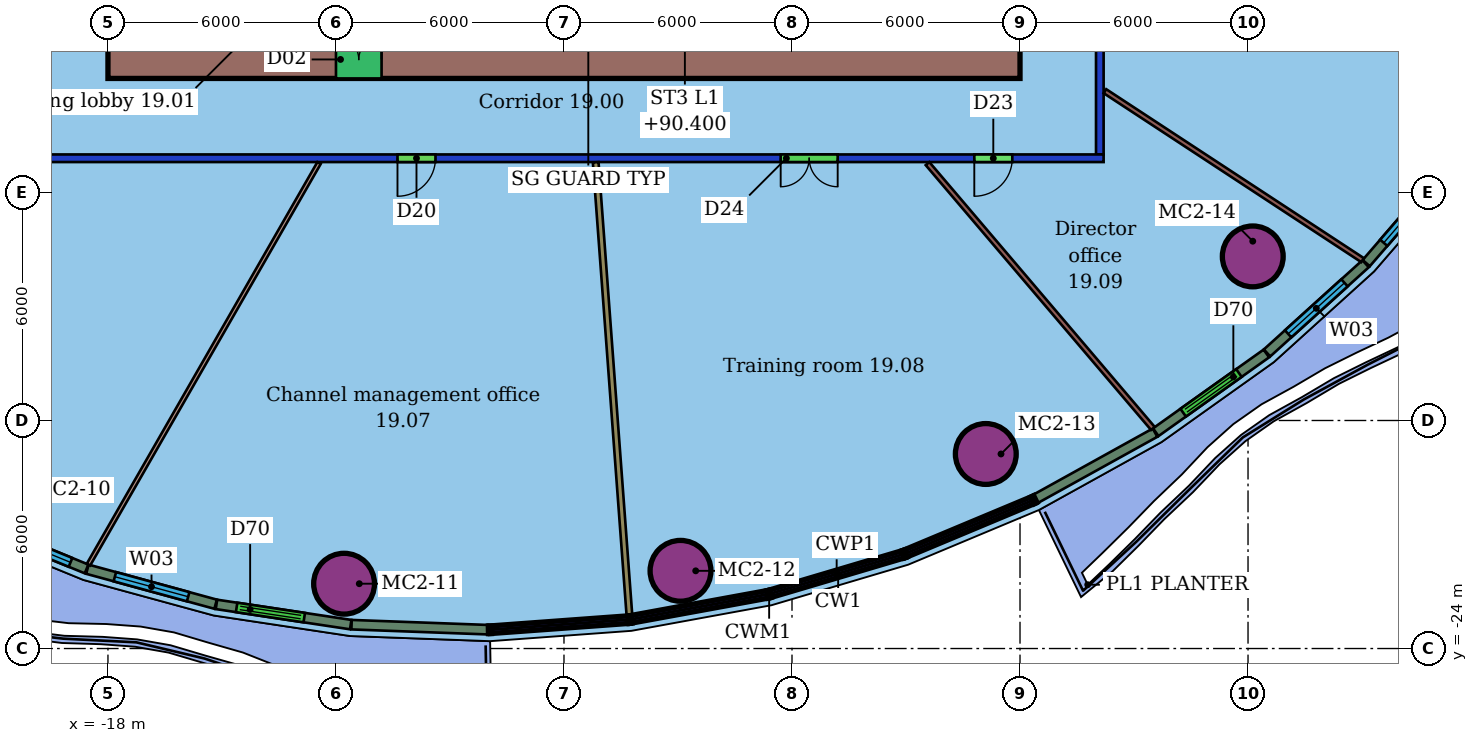
"""IFC4 building model, lengths in metres.
Left out: names, types, materials, properties, quantities, classifications, styles, units other than length and angle.
Written with IfcOpenShell. Run it as: python <this file> out.ifc"""

import sys

from ifc_helpers import new_model, si_unit, direction, frame, frame_2d, origin, origin_2d, place, context, subcontext, project, spatial, rectangle, hollow_circle, extrude, element, fill, save


model = new_model("IFC4")
c1 = context("Model", 3, precision=1e-05, world=origin(), true_north=direction((0.0, 1.0)))
c2 = subcontext(c1, "Body", "Model", "MODEL_VIEW")
j1 = project(units=[si_unit("LENGTHUNIT", "METRE"), si_unit("PLANEANGLEUNIT", "RADIAN")], contexts=[c1])
p1 = place(None, origin())
s1 = spatial("IfcSite", under=j1, at=p1, CompositionType="ELEMENT")
p2 = place(p1, origin())
s2 = spatial("IfcBuilding", under=s1, at=p2, CompositionType="ELEMENT")
p3 = place(p2, frame((0.0, 0.0, 88.6)))
s3 = spatial("IfcBuildingStorey", under=s2, at=p3, CompositionType="ELEMENT", Elevation=88.6)
for number, where, z_axis, x_axis in (
    (1, (-11.787, -22.294, 0.0), (0.0, 0.0, 1.0), (1.0, 0.0, 0.0)),
    (2, (-2.934, -21.956, 0.0), (0.0, 0.0, 1.0), (1.0, 0.0, 0.0)),
    (3, (5.1, -18.881, 0.0), (0.0, 0.0, 1.0), (1.0, 0.0, 0.0)),
    (4, (12.125, -13.683, 0.0), (0.0, 0.0, 1.0), (1.0, 0.0, 0.0)),
):
    element("IfcColumn", number, at=place(p3, frame(where, z_axis=z_axis, x_axis=x_axis)), inside=s3, PredefinedType="COLUMN", context=c2, shape_type="SweptSolid", body=[
        extrude(hollow_circle(Radius=0.8, WallThickness=0.055, at=origin_2d()), origin(), (0.0, 0.0, 1.0), 3.45),
    ])
p4 = place(p3, frame((8.2, -11.1, 0.0), z_axis=(0.0, 0.0, 1.0), x_axis=(-1.0, 0.0, 0.0)))
e5 = element("IfcWall", 5, at=p4, inside=s3, PredefinedType="PARTITIONING", context=c2, shape_type="SweptSolid", body=[
    extrude(rectangle(XDim=28.4, YDim=0.2, at=frame_2d((14.2, 0.0))), origin(), (0.0, 0.0, 1.0), 3.0),
])
p5 = place(p4, frame((17.581, 0.0, 0.0)))
e6 = element("IfcOpeningElement", 6, at=p5, cuts=e5, PredefinedType="OPENING", context=c2, shape_type="SweptSolid", body=[
    extrude(rectangle(XDim=1.0, YDim=2.1, at=frame_2d((0.5, 1.05))), frame((0.0, 0.11, 0.0), z_axis=(0.0, -1.0, 0.0), x_axis=(1.0, 0.0, 0.0)), (0.0, 0.0, 1.0), 0.22),
])
p6 = place(p4, frame((6.998, 0.0, 0.0)))
e7 = element("IfcOpeningElement", 7, at=p6, cuts=e5, PredefinedType="OPENING", context=c2, shape_type="SweptSolid", body=[
    extrude(rectangle(XDim=1.5, YDim=2.1, at=frame_2d((0.75, 1.05))), frame((0.0, 0.11, 0.0), z_axis=(0.0, -1.0, 0.0), x_axis=(1.0, 0.0, 0.0)), (0.0, 0.0, 1.0), 0.22),
])
p7 = place(p4, frame((2.403, 0.0, 0.0)))
e8 = element("IfcOpeningElement", 8, at=p7, cuts=e5, PredefinedType="OPENING", context=c2, shape_type="SweptSolid", body=[
    extrude(rectangle(XDim=1.0, YDim=2.4, at=frame_2d((0.5, 1.2))), frame((0.0, 0.11, 0.0), z_axis=(0.0, -1.0, 0.0), x_axis=(1.0, 0.0, 0.0)), (0.0, 0.0, 1.0), 0.22),
])
p8 = place(p3, frame((8.1, 11.0, 0.0), z_axis=(0.0, 0.0, 1.0), x_axis=(0.0, -1.0, 0.0)))
e9 = element("IfcWall", 9, at=p8, inside=s3, PredefinedType="PARTITIONING", context=c2, shape_type="SweptSolid", body=[
    extrude(rectangle(XDim=22.0, YDim=0.2, at=frame_2d((11.0, 0.0))), origin(), (0.0, 0.0, 1.0), 3.0),
])
p9 = place(p8, frame((11.043, 0.0, 0.0)))
e10 = element("IfcOpeningElement", 10, at=p9, cuts=e9, PredefinedType="OPENING", context=c2, shape_type="SweptSolid", body=[
    extrude(rectangle(XDim=1.8, YDim=2.1, at=frame_2d((0.9, 1.05))), frame((0.0, 0.11, 0.0), z_axis=(0.0, -1.0, 0.0), x_axis=(1.0, 0.0, 0.0)), (0.0, 0.0, 1.0), 0.22),
])
p10 = place(p3, frame((-18.512, -21.792, 0.0), z_axis=(0.0, 0.0, 1.0), x_axis=(0.497918029238, 0.867224098004, 0.0)))
e11 = element("IfcWall", 11, at=p10, inside=s3, PredefinedType="PARTITIONING", context=c2, shape_type="SweptSolid", body=[
    extrude(rectangle(XDim=12.185, YDim=0.1, at=frame_2d((6.093, 0.0))), origin(), (0.0, 0.0, 1.0), 3.45),
])
p11 = place(p3, frame((-4.279, -23.113, 0.0), z_axis=(0.0, 0.0, 1.0), x_axis=(-0.074241475943, 0.997240293635, 0.0)))
e12 = element("IfcWall", 12, at=p11, inside=s3, PredefinedType="PARTITIONING", context=c2, shape_type="SweptSolid", body=[
    extrude(rectangle(XDim=11.94, YDim=0.15, at=frame_2d((5.97, 0.0))), origin(), (0.0, 0.0, 1.0), 3.45),
])
p12 = place(p3, frame((9.496, -18.209, 0.0), z_axis=(0.0, 0.0, 1.0), x_axis=(-0.648104472947, 0.761551437624, 0.0)))
e13 = element("IfcWall", 13, at=p12, inside=s3, PredefinedType="PARTITIONING", context=c2, shape_type="SweptSolid", body=[
    extrude(rectangle(XDim=9.15, YDim=0.125, at=frame_2d((4.575, 0.0))), origin(), (0.0, 0.0, 1.0), 3.45),
])
p13 = place(p3, frame((15.013, -13.78, 0.0), z_axis=(0.0, 0.0, 1.0), x_axis=(-0.836224442923, 0.548387345822, 0.0)))
e14 = element("IfcWall", 14, at=p13, inside=s3, PredefinedType="PARTITIONING", context=c2, shape_type="SweptSolid", body=[
    extrude(rectangle(XDim=8.106, YDim=0.125, at=frame_2d((4.053, 0.0))), origin(), (0.0, 0.0, 1.0), 3.45),
])
p14 = place(p3, frame((-21.721, -20.613, 0.0), z_axis=(0.0, 0.0, 1.0), x_axis=(0.925471723518, -0.378816695735, 0.0)))
e15 = element("IfcWall", 15, at=p14, inside=s3, PredefinedType="SOLIDWALL", context=c2, shape_type="SweptSolid", body=[
    extrude(rectangle(XDim=3.413, YDim=0.25, at=frame_2d((1.706, 0.0))), origin(), (0.0, 0.0, 1.0), 3.05),
])
p15 = place(p14, frame((0.956, 0.0, 0.9)))
e16 = element("IfcOpeningElement", 16, at=p15, cuts=e15, PredefinedType="OPENING", context=c2, shape_type="SweptSolid", body=[
    extrude(rectangle(XDim=2.0, YDim=2.1, at=frame_2d((1.0, 1.05))), frame((0.0, 0.135, 0.0), z_axis=(0.0, -1.0, 0.0), x_axis=(1.0, 0.0, 0.0)), (0.0, 0.0, 1.0), 0.27),
])
p16 = place(p3, frame((-18.541, -21.913, 0.0), z_axis=(0.0, 0.0, 1.0), x_axis=(0.964717093179, -0.263288682112, 0.0)))
e17 = element("IfcWall", 17, at=p16, inside=s3, PredefinedType="SOLIDWALL", context=c2, shape_type="SweptSolid", body=[
    extrude(rectangle(XDim=3.498, YDim=0.25, at=frame_2d((1.749, 0.0))), origin(), (0.0, 0.0, 1.0), 3.05),
])
p17 = place(p16, frame((0.749, 0.0, 0.9)))
e18 = element("IfcOpeningElement", 18, at=p17, cuts=e17, PredefinedType="OPENING", context=c2, shape_type="SweptSolid", body=[
    extrude(rectangle(XDim=2.0, YDim=2.1, at=frame_2d((1.0, 1.05))), frame((0.0, 0.135, 0.0), z_axis=(0.0, -1.0, 0.0), x_axis=(1.0, 0.0, 0.0)), (0.0, 0.0, 1.0), 0.27),
])
p18 = place(p3, frame((-15.145, -22.839, 0.0), z_axis=(0.0, 0.0, 1.0), x_axis=(0.988850976046, -0.148908519475, 0.0)))
e19 = element("IfcWall", 19, at=p18, inside=s3, PredefinedType="SOLIDWALL", context=c2, shape_type="SweptSolid", body=[
    extrude(rectangle(XDim=3.573, YDim=0.25, at=frame_2d((1.786, 0.0))), origin(), (0.0, 0.0, 1.0), 3.05),
])
p19 = place(p18, frame((0.536, 0.0, 0.0)))
e20 = element("IfcOpeningElement", 20, at=p19, cuts=e19, PredefinedType="OPENING", context=c2, shape_type="SweptSolid", body=[
    extrude(rectangle(XDim=1.8, YDim=2.4, at=frame_2d((0.9, 1.2))), frame((0.0, 0.135, 0.0), z_axis=(0.0, -1.0, 0.0), x_axis=(1.0, 0.0, 0.0)), (0.0, 0.0, 1.0), 0.27),
])
p20 = place(p3, frame((-11.59, -23.373, 0.0), z_axis=(0.0, 0.0, 1.0), x_axis=(0.999324862533, -0.036739884652, 0.0)))
e21 = element("IfcWall", 21, at=p20, inside=s3, PredefinedType="SOLIDWALL", context=c2, shape_type="SweptSolid", body=[
    extrude(rectangle(XDim=3.588, YDim=0.25, at=frame_2d((1.794, 0.0))), origin(), (0.0, 0.0, 1.0), 3.05),
])
p21 = place(p3, frame((6.415, -20.059, 0.0), z_axis=(0.0, 0.0, 1.0), x_axis=(0.874740773149, 0.484591147042, 0.0)))
e22 = element("IfcWall", 22, at=p21, inside=s3, PredefinedType="SOLIDWALL", context=c2, shape_type="SweptSolid", body=[
    extrude(rectangle(XDim=3.588, YDim=0.25, at=frame_2d((1.794, 0.0))), origin(), (0.0, 0.0, 1.0), 3.05),
])
p22 = place(p3, frame((9.572, -18.308, 0.0), z_axis=(0.0, 0.0, 1.0), x_axis=(0.814702052805, 0.579879785089, 0.0)))
e23 = element("IfcWall", 23, at=p22, inside=s3, PredefinedType="SOLIDWALL", context=c2, shape_type="SweptSolid", body=[
    extrude(rectangle(XDim=3.572, YDim=0.25, at=frame_2d((1.786, 0.0))), origin(), (0.0, 0.0, 1.0), 3.05),
])
p23 = place(p22, frame((0.886, 0.0, 0.0)))
e24 = element("IfcOpeningElement", 24, at=p23, cuts=e23, PredefinedType="OPENING", context=c2, shape_type="SweptSolid", body=[
    extrude(rectangle(XDim=1.8, YDim=2.4, at=frame_2d((0.9, 1.2))), frame((0.0, 0.135, 0.0), z_axis=(0.0, -1.0, 0.0), x_axis=(1.0, 0.0, 0.0)), (0.0, 0.0, 1.0), 0.27),
])
p24 = place(p3, frame((12.5, -16.223, 0.0), z_axis=(0.0, 0.0, 1.0), x_axis=(0.741507668803, 0.670944391962, 0.0)))
e25 = element("IfcWall", 25, at=p24, inside=s3, PredefinedType="SOLIDWALL", context=c2, shape_type="SweptSolid", body=[
    extrude(rectangle(XDim=3.498, YDim=0.25, at=frame_2d((1.749, 0.0))), origin(), (0.0, 0.0, 1.0), 3.05),
])
p25 = place(p24, frame((0.749, 0.0, 0.9)))
e26 = element("IfcOpeningElement", 26, at=p25, cuts=e25, PredefinedType="OPENING", context=c2, shape_type="SweptSolid", body=[
    extrude(rectangle(XDim=2.0, YDim=2.1, at=frame_2d((1.0, 1.05))), frame((0.0, 0.135, 0.0), z_axis=(0.0, -1.0, 0.0), x_axis=(1.0, 0.0, 0.0)), (0.0, 0.0, 1.0), 0.27),
])
p26 = place(p3, frame((15.11, -13.859, 0.0), z_axis=(0.0, 0.0, 1.0), x_axis=(0.654178480437, 0.756340211633, 0.0)))
e27 = element("IfcWall", 27, at=p26, inside=s3, PredefinedType="SOLIDWALL", context=c2, shape_type="SweptSolid", body=[
    extrude(rectangle(XDim=3.413, YDim=0.25, at=frame_2d((1.706, 0.0))), origin(), (0.0, 0.0, 1.0), 3.05),
])
p27 = place(p26, frame((0.706, 0.0, 0.9)))
e28 = element("IfcOpeningElement", 28, at=p27, cuts=e27, PredefinedType="OPENING", context=c2, shape_type="SweptSolid", body=[
    extrude(rectangle(XDim=2.0, YDim=2.1, at=frame_2d((1.0, 1.05))), frame((0.0, 0.135, 0.0), z_axis=(0.0, -1.0, 0.0), x_axis=(1.0, 0.0, 0.0)), (0.0, 0.0, 1.0), 0.27),
])
p28 = place(p3, frame((-18.0, -8.5, 0.0), z_axis=(0.0, 0.0, 1.0), x_axis=(1.0, 0.0, 0.0)))
e29 = element("IfcWall", 29, at=p28, inside=s3, PredefinedType="SHEAR", context=c2, shape_type="SweptSolid", body=[
    extrude(rectangle(XDim=24.0, YDim=1.0, at=frame_2d((12.0, 0.0))), origin(), (0.0, 0.0, 1.0), 3.3),
])
p29 = place(p28, frame((6.0, 0.0, 0.0)))
e30 = element("IfcOpeningElement", 30, at=p29, cuts=e29, PredefinedType="OPENING", context=c2, shape_type="SweptSolid", body=[
    extrude(rectangle(XDim=1.2, YDim=2.1, at=frame_2d((0.6, 1.05))), frame((0.0, 0.51, 0.0), z_axis=(0.0, -1.0, 0.0), x_axis=(1.0, 0.0, 0.0)), (0.0, 0.0, 1.0), 1.02),
])
p30 = place(p5, origin())
e31 = element("IfcDoor", 31, at=p30, inside=s3, OperationType="SINGLE_SWING_RIGHT", PredefinedType="DOOR", context=c2, shape_type="SweptSolid", body=[
    extrude(rectangle(XDim=1.0, YDim=2.1, at=frame_2d((0.5, 1.05))), frame((0.0, 0.025, 0.0), z_axis=(0.0, -1.0, 0.0), x_axis=(1.0, 0.0, 0.0)), (0.0, 0.0, 1.0), 0.05),
])
fill(e6, e31)
p31 = place(p6, origin())
e32 = element("IfcDoor", 32, at=p31, inside=s3, OperationType="DOUBLE_DOOR_SINGLE_SWING", PredefinedType="DOOR", context=c2, shape_type="SweptSolid", body=[
    extrude(rectangle(XDim=1.5, YDim=2.1, at=frame_2d((0.75, 1.05))), frame((0.0, 0.025, 0.0), z_axis=(0.0, -1.0, 0.0), x_axis=(1.0, 0.0, 0.0)), (0.0, 0.0, 1.0), 0.05),
])
fill(e7, e32)
p32 = place(p7, origin())
e33 = element("IfcDoor", 33, at=p32, inside=s3, OperationType="SINGLE_SWING_RIGHT", PredefinedType="DOOR", context=c2, shape_type="SweptSolid", body=[
    extrude(rectangle(XDim=1.0, YDim=2.4, at=frame_2d((0.5, 1.2))), frame((0.0, 0.025, 0.0), z_axis=(0.0, -1.0, 0.0), x_axis=(1.0, 0.0, 0.0)), (0.0, 0.0, 1.0), 0.05),
])
fill(e8, e33)
p33 = place(p15, origin())
e34 = element("IfcWindow", 34, at=p33, inside=s3, PartitioningType="SINGLE_PANEL", PredefinedType="WINDOW", context=c2, shape_type="SweptSolid", body=[
    extrude(rectangle(XDim=2.0, YDim=2.1, at=frame_2d((1.0, 1.05))), frame((0.0, 0.03, 0.0), z_axis=(0.0, -1.0, 0.0), x_axis=(1.0, 0.0, 0.0)), (0.0, 0.0, 1.0), 0.06),
])
fill(e16, e34)
p34 = place(p17, origin())
e35 = element("IfcWindow", 35, at=p34, inside=s3, PartitioningType="SINGLE_PANEL", PredefinedType="WINDOW", context=c2, shape_type="SweptSolid", body=[
    extrude(rectangle(XDim=2.0, YDim=2.1, at=frame_2d((1.0, 1.05))), frame((0.0, 0.03, 0.0), z_axis=(0.0, -1.0, 0.0), x_axis=(1.0, 0.0, 0.0)), (0.0, 0.0, 1.0), 0.06),
])
fill(e18, e35)
p35 = place(p19, origin())
e36 = element("IfcDoor", 36, at=p35, inside=s3, OperationType="DOUBLE_DOOR_SLIDING", PredefinedType="DOOR", context=c2, shape_type="SweptSolid", body=[
    extrude(rectangle(XDim=1.8, YDim=2.4, at=frame_2d((0.9, 1.2))), frame((0.0, 0.025, 0.0), z_axis=(0.0, -1.0, 0.0), x_axis=(1.0, 0.0, 0.0)), (0.0, 0.0, 1.0), 0.05),
])
fill(e20, e36)
p36 = place(p23, origin())
e37 = element("IfcDoor", 37, at=p36, inside=s3, OperationType="DOUBLE_DOOR_SLIDING", PredefinedType="DOOR", context=c2, shape_type="SweptSolid", body=[
    extrude(rectangle(XDim=1.8, YDim=2.4, at=frame_2d((0.9, 1.2))), frame((0.0, 0.025, 0.0), z_axis=(0.0, -1.0, 0.0), x_axis=(1.0, 0.0, 0.0)), (0.0, 0.0, 1.0), 0.05),
])
fill(e24, e37)
p37 = place(p25, origin())
e38 = element("IfcWindow", 38, at=p37, inside=s3, PartitioningType="SINGLE_PANEL", PredefinedType="WINDOW", context=c2, shape_type="SweptSolid", body=[
    extrude(rectangle(XDim=2.0, YDim=2.1, at=frame_2d((1.0, 1.05))), frame((0.0, 0.03, 0.0), z_axis=(0.0, -1.0, 0.0), x_axis=(1.0, 0.0, 0.0)), (0.0, 0.0, 1.0), 0.06),
])
fill(e26, e38)
p38 = place(p27, origin())
e39 = element("IfcWindow", 39, at=p38, inside=s3, PartitioningType="SINGLE_PANEL", PredefinedType="WINDOW", context=c2, shape_type="SweptSolid", body=[
    extrude(rectangle(XDim=2.0, YDim=2.1, at=frame_2d((1.0, 1.05))), frame((0.0, 0.03, 0.0), z_axis=(0.0, -1.0, 0.0), x_axis=(1.0, 0.0, 0.0)), (0.0, 0.0, 1.0), 0.06),
])
fill(e28, e39)
p39 = place(p29, origin())
e40 = element("IfcDoor", 40, at=p39, inside=s3, OperationType="DOUBLE_DOOR_SINGLE_SWING", PredefinedType="NOTDEFINED", context=c2, shape_type="SweptSolid", body=[
    extrude(rectangle(XDim=1.2, YDim=2.1, at=frame_2d((0.6, 1.05))), frame((0.0, 0.025, 0.0), z_axis=(0.0, -1.0, 0.0), x_axis=(1.0, 0.0, 0.0)), (0.0, 0.0, 1.0), 0.05),
])
fill(e30, e40)
save(model, sys.argv[1])
